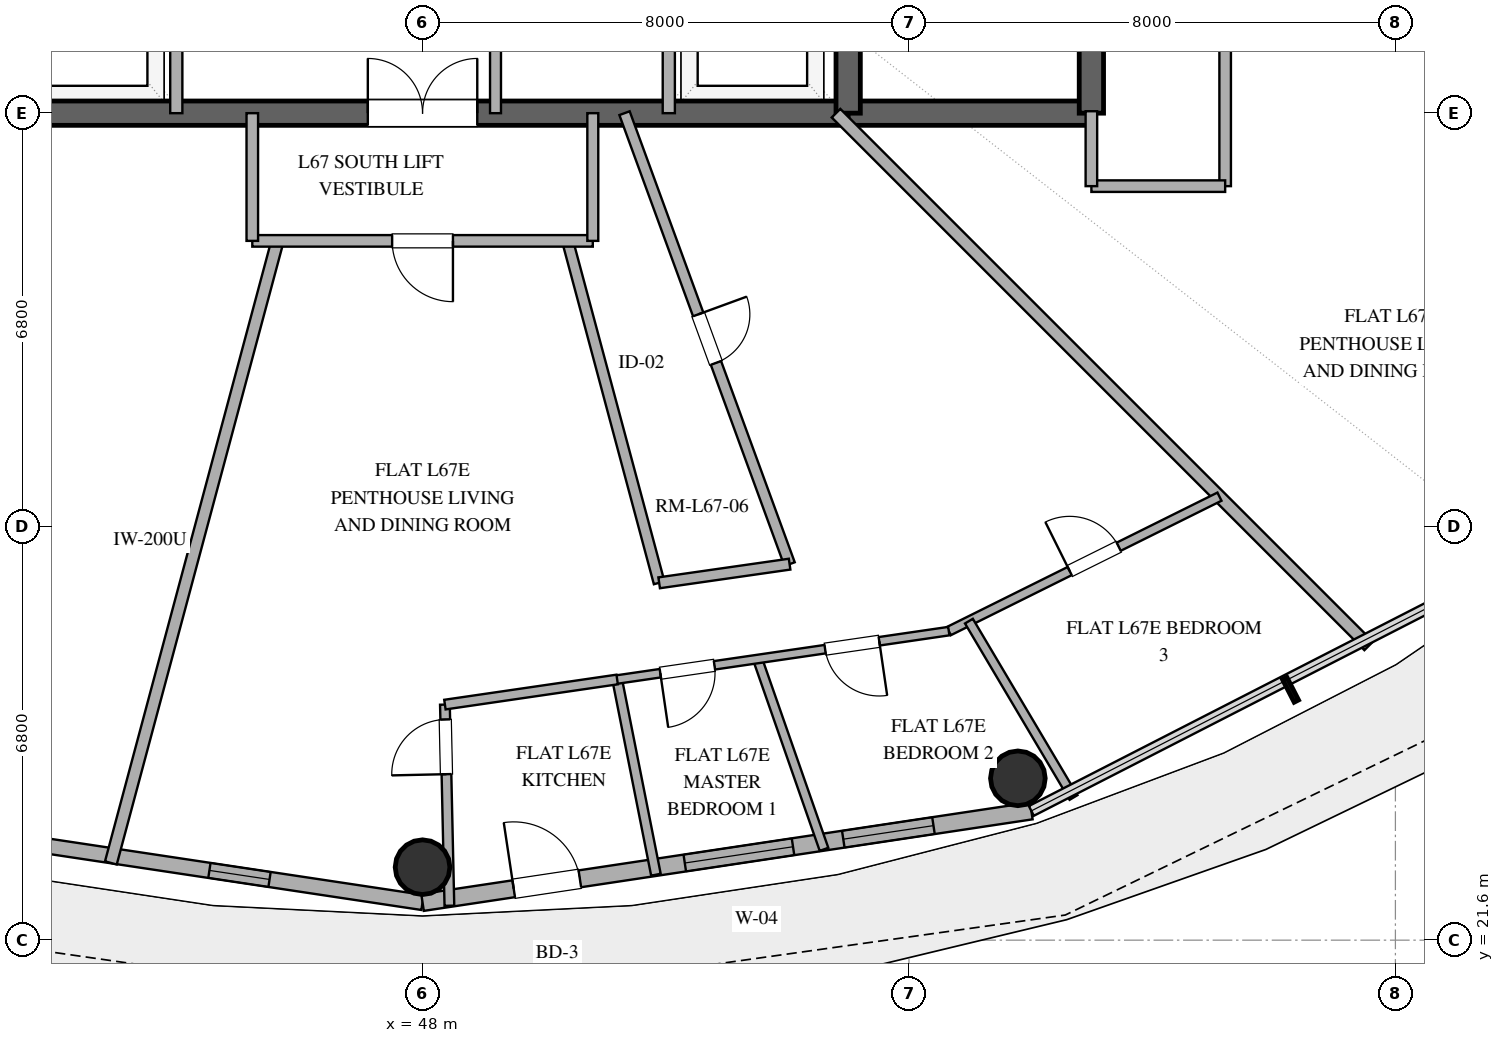
"""IFC4 building model, lengths in metres.
Left out: names, types, materials, properties, quantities, classifications, styles, units other than length and angle.
Written with IfcOpenShell. Run it as: python <this file> out.ifc"""

import sys

from ifc_helpers import new_model, si_unit, direction, frame, frame_2d, origin, origin_2d, place, context, subcontext, project, spatial, rectangle, hollow_circle, extrude, element, fill, save


model = new_model("IFC4")
c1 = context("Model", 3, precision=1e-05, world=origin(), true_north=direction((0.0, 1.0)))
c2 = subcontext(c1, "Body", "Model", "MODEL_VIEW")
j1 = project(units=[si_unit("LENGTHUNIT", "METRE"), si_unit("PLANEANGLEUNIT", "RADIAN")], contexts=[c1])
p1 = place(None, origin())
s1 = spatial("IfcSite", under=j1, at=p1, CompositionType="ELEMENT")
p2 = place(p1, origin())
s2 = spatial("IfcBuilding", under=s1, at=p2, CompositionType="ELEMENT")
p3 = place(p2, frame((0.0, 0.0, 262.2)))
s3 = spatial("IfcBuildingStorey", under=s2, at=p3, CompositionType="ELEMENT", Elevation=262.2)
p4 = place(p3, frame((41.0, 35.2, 0.0), z_axis=(0.0, 0.0, 1.0), x_axis=(1.0, 0.0, 0.0)))
e1 = element("IfcWall", 1, at=p4, inside=s3, PredefinedType="SHEAR", context=c2, shape_type="SweptSolid", body=[
    extrude(rectangle(XDim=14.0, YDim=0.4, at=frame_2d((7.0, 0.0))), origin(), (0.0, 0.0, 1.0), 3.37),
])
p5 = place(p4, frame((6.1, 0.0, 0.0)))
e2 = element("IfcOpeningElement", 2, at=p5, cuts=e1, PredefinedType="OPENING", context=c2, shape_type="SweptSolid", body=[
    extrude(rectangle(XDim=1.8, YDim=2.25, at=frame_2d((0.9, 1.125))), frame((0.0, 0.21, 0.0), z_axis=(0.0, -1.0, 0.0), x_axis=(1.0, 0.0, 0.0)), (0.0, 0.0, 1.0), 0.42),
])
p6 = place(p3, frame((55.0, 35.2, 0.0), z_axis=(0.0, 0.0, 1.0), x_axis=(1.0, 0.0, 0.0)))
e3 = element("IfcWall", 3, at=p6, inside=s3, PredefinedType="SHEAR", context=c2, shape_type="SweptSolid", body=[
    extrude(rectangle(XDim=4.0, YDim=0.4, at=frame_2d((2.0, 0.0))), origin(), (0.0, 0.0, 1.0), 3.37),
])
p7 = place(p3, frame((59.0, 35.2, 0.0), z_axis=(0.0, 0.0, 1.0), x_axis=(0.0, 1.0, 0.0)))
e4 = element("IfcWall", 4, at=p7, inside=s3, PredefinedType="SHEAR", context=c2, shape_type="SweptSolid", body=[
    extrude(rectangle(XDim=13.6, YDim=0.4, at=frame_2d((6.8, 0.0))), origin(), (0.0, 0.0, 1.0), 3.37),
])
p8 = place(p7, frame((1.5, 0.0, 0.0)))
e5 = element("IfcOpeningElement", 5, at=p8, cuts=e4, PredefinedType="OPENING", context=c2, shape_type="SweptSolid", body=[
    extrude(rectangle(XDim=1.2, YDim=2.15, at=frame_2d((0.6, 1.075))), frame((0.0, 0.21, 0.0), z_axis=(0.0, -1.0, 0.0), x_axis=(1.0, 0.0, 0.0)), (0.0, 0.0, 1.0), 0.42),
])
p9 = place(p3, frame((55.0, 35.2, 0.0), z_axis=(0.0, 0.0, 1.0), x_axis=(0.0, 1.0, 0.0)))
e6 = element("IfcWall", 6, at=p9, inside=s3, PredefinedType="SHEAR", context=c2, shape_type="SweptSolid", body=[
    extrude(rectangle(XDim=13.6, YDim=0.4, at=frame_2d((6.8, 0.0))), origin(), (0.0, 0.0, 1.0), 3.37),
])
p10 = place(p9, frame((1.15, 0.0, 0.0)))
e7 = element("IfcOpeningElement", 7, at=p10, cuts=e6, PredefinedType="OPENING", context=c2, shape_type="SweptSolid", body=[
    extrude(rectangle(XDim=1.1, YDim=2.2, at=frame_2d((0.55, 1.1))), frame((0.0, 0.21, 0.0), z_axis=(0.0, -1.0, 0.0), x_axis=(1.0, 0.0, 0.0)), (0.0, 0.0, 1.0), 0.42),
])
for number, where, z_axis, x_axis in (
    (8, (48.0, 22.8, 0.0), (0.0, 0.0, 1.0), (1.0, 0.0, 0.0)),
    (9, (57.791, 24.261, 0.0), (0.0, 0.0, 1.0), (1.0, 0.0, 0.0)),
):
    element("IfcColumn", number, at=place(p3, frame(where, z_axis=z_axis, x_axis=x_axis)), inside=s3, PredefinedType="COLUMN", context=c2, shape_type="SweptSolid", body=[
        extrude(hollow_circle(Radius=0.45, WallThickness=0.025, at=origin_2d()), origin(), (0.0, 0.0, 1.0), 3.37),
    ])
p11 = place(p3, frame((37.987, 23.726, 0.0), z_axis=(0.0, 0.0, 1.0), x_axis=(0.988882522213, -0.148698881169, 0.0)))
e10 = element("IfcWall", 10, at=p11, inside=s3, PredefinedType="SOLIDWALL", context=c2, shape_type="SweptSolid", body=[
    extrude(rectangle(XDim=10.125, YDim=0.25, at=frame_2d((5.062, 0.0))), origin(), (0.0, 0.0, 1.0), 3.37),
])
p12 = place(p11, frame((6.581, 0.0, 1.42)))
e11 = element("IfcOpeningElement", 11, at=p12, cuts=e10, PredefinedType="OPENING", context=c2, shape_type="SweptSolid", body=[
    extrude(rectangle(XDim=1.0, YDim=1.05, at=frame_2d((0.5, 0.525))), frame((0.0, 0.135, 0.0), z_axis=(0.0, -1.0, 0.0), x_axis=(1.0, 0.0, 0.0)), (0.0, 0.0, 1.0), 0.27),
])
p13 = place(p3, frame((48.0, 22.22, 0.0), z_axis=(0.0, 0.0, 1.0), x_axis=(0.988882522213, 0.148698881169, 0.0)))
e12 = element("IfcWall", 12, at=p13, inside=s3, PredefinedType="SOLIDWALL", context=c2, shape_type="SweptSolid", body=[
    extrude(rectangle(XDim=10.125, YDim=0.28, at=frame_2d((5.062, 0.0))), origin(), (0.0, 0.0, 1.0), 3.37),
])
p14 = place(p13, frame((1.516, 0.0, 0.0)))
e13 = element("IfcOpeningElement", 13, at=p14, cuts=e12, PredefinedType="OPENING", context=c2, shape_type="SweptSolid", body=[
    extrude(rectangle(XDim=1.1, YDim=2.25, at=frame_2d((0.55, 1.125))), frame((0.0, 0.15, 0.0), z_axis=(0.0, -1.0, 0.0), x_axis=(1.0, 0.0, 0.0)), (0.0, 0.0, 1.0), 0.3),
])
p15 = place(p13, frame((4.361, 0.0, 0.85)))
e14 = element("IfcOpeningElement", 14, at=p15, cuts=e12, PredefinedType="OPENING", context=c2, shape_type="SweptSolid", body=[
    extrude(rectangle(XDim=1.8, YDim=2.2, at=frame_2d((0.9, 1.1))), frame((0.0, 0.15, 0.0), z_axis=(0.0, -1.0, 0.0), x_axis=(1.0, 0.0, 0.0)), (0.0, 0.0, 1.0), 0.3),
])
p16 = place(p13, frame((6.997, 0.0, 0.85)))
e15 = element("IfcOpeningElement", 15, at=p16, cuts=e12, PredefinedType="OPENING", context=c2, shape_type="SweptSolid", body=[
    extrude(rectangle(XDim=1.5, YDim=2.0, at=frame_2d((0.75, 1.0))), frame((0.0, 0.15, 0.0), z_axis=(0.0, -1.0, 0.0), x_axis=(1.0, 0.0, 0.0)), (0.0, 0.0, 1.0), 0.3),
])
for number, where, z_axis, x_axis in (
    (16, (43.95, 35.2, 0.0), (0.0, 0.0, 1.0), (0.0, 1.0, 0.0)),
    (17, (52.05, 35.2, 0.0), (0.0, 0.0, 1.0), (0.0, 1.0, 0.0)),
):
    element("IfcWall", number, at=place(p3, frame(where, z_axis=z_axis, x_axis=x_axis)), inside=s3, PredefinedType="SOLIDWALL", context=c2, shape_type="SweptSolid", body=[
        extrude(rectangle(XDim=3.2, YDim=0.2, at=frame_2d((1.6, 0.0))), origin(), (0.0, 0.0, 1.0), 2.73),
    ])
p17 = place(p3, frame((49.2, 35.2, 0.0), z_axis=(0.0, 0.0, 1.0), x_axis=(0.0, 1.0, 0.0)))
e18 = element("IfcWall", 18, at=p17, inside=s3, PredefinedType="PLUMBINGWALL", context=c2, shape_type="SweptSolid", body=[
    extrude(rectangle(XDim=3.2, YDim=0.18, at=frame_2d((1.6, 0.0))), origin(), (0.0, 0.0, 1.0), 2.73),
])
p18 = place(p17, frame((1.15, 0.0, 0.0)))
e19 = element("IfcOpeningElement", 19, at=p18, cuts=e18, PredefinedType="OPENING", context=c2, shape_type="SweptSolid", body=[
    extrude(rectangle(XDim=0.9, YDim=2.1, at=frame_2d((0.45, 1.05))), frame((0.0, 0.1, 0.0), z_axis=(0.0, -1.0, 0.0), x_axis=(1.0, 0.0, 0.0)), (0.0, 0.0, 1.0), 0.2),
])
p19 = place(p3, frame((42.874, 22.87, 0.0), z_axis=(0.0, 0.0, 1.0), x_axis=(0.258827496332, 0.965923561749, 0.0)))
e20 = element("IfcWall", 20, at=p19, inside=s3, PredefinedType="PARTITIONING", context=c2, shape_type="SweptSolid", body=[
    extrude(rectangle(XDim=10.591, YDim=0.2, at=frame_2d((5.295, 0.0))), origin(), (0.0, 0.0, 1.0), 2.73),
])
p20 = place(p3, frame((63.561, 26.439, 0.0), z_axis=(0.0, 0.0, 1.0), x_axis=(-0.707106781187, 0.707106781187, 0.0)))
e21 = element("IfcWall", 21, at=p20, inside=s3, PredefinedType="PARTITIONING", context=c2, shape_type="SweptSolid", body=[
    extrude(rectangle(XDim=12.389, YDim=0.2, at=frame_2d((6.195, 0.0))), origin(), (0.0, 0.0, 1.0), 2.73),
])
p21 = place(p3, frame((51.322, 35.2, 0.0), z_axis=(0.0, 0.0, 1.0), x_axis=(0.343730484072, -0.939068343796, 0.0)))
e22 = element("IfcWall", 22, at=p21, inside=s3, PredefinedType="PLUMBINGWALL", context=c2, shape_type="SweptSolid", body=[
    extrude(rectangle(XDim=7.897, YDim=0.18, at=frame_2d((3.949, 0.0))), origin(), (0.0, 0.0, 1.0), 2.73),
])
p22 = place(p21, frame((3.524, 0.0, 0.0)))
e23 = element("IfcOpeningElement", 23, at=p22, cuts=e22, PredefinedType="OPENING", context=c2, shape_type="SweptSolid", body=[
    extrude(rectangle(XDim=0.85, YDim=2.1, at=frame_2d((0.425, 1.05))), frame((0.0, 0.1, 0.0), z_axis=(0.0, -1.0, 0.0), x_axis=(1.0, 0.0, 0.0)), (0.0, 0.0, 1.0), 0.2),
])
p23 = place(p3, frame((51.892, 27.477, 0.0), z_axis=(0.0, 0.0, 1.0), x_axis=(-0.258831810373, 0.965922405755, 0.0)))
e24 = element("IfcWall", 24, at=p23, inside=s3, PredefinedType="PLUMBINGWALL", context=c2, shape_type="SweptSolid", body=[
    extrude(rectangle(XDim=5.822, YDim=0.18, at=frame_2d((2.911, 0.0))), origin(), (0.0, 0.0, 1.0), 2.73),
])
p24 = place(p3, frame((50.8, 33.1, 0.0), z_axis=(0.0, 0.0, 1.0), x_axis=(-1.0, 0.0, 0.0)))
e25 = element("IfcWall", 25, at=p24, inside=s3, PredefinedType="PARTITIONING", context=c2, shape_type="SweptSolid", body=[
    extrude(rectangle(XDim=5.6, YDim=0.19, at=frame_2d((2.8, 0.0))), origin(), (0.0, 0.0, 1.0), 2.73),
])
p25 = place(p24, frame((2.3, 0.0, 0.0)))
e26 = element("IfcOpeningElement", 26, at=p25, cuts=e25, PredefinedType="OPENING", context=c2, shape_type="SweptSolid", body=[
    extrude(rectangle(XDim=1.0, YDim=2.2, at=frame_2d((0.5, 1.1))), frame((0.0, 0.105, 0.0), z_axis=(0.0, -1.0, 0.0), x_axis=(1.0, 0.0, 0.0)), (0.0, 0.0, 1.0), 0.21),
])
p26 = place(p3, frame((56.655, 26.682, 0.0), z_axis=(0.0, 0.0, 1.0), x_axis=(0.895583327025, 0.444893812449, 0.0)))
e27 = element("IfcWall", 27, at=p26, inside=s3, PredefinedType="PARTITIONING", context=c2, shape_type="SweptSolid", body=[
    extrude(rectangle(XDim=4.971, YDim=0.15, at=frame_2d((2.485, 0.0))), origin(), (0.0, 0.0, 1.0), 2.73),
])
p27 = place(p26, frame((2.22, 0.0, 0.0)))
e28 = element("IfcOpeningElement", 28, at=p27, cuts=e27, PredefinedType="OPENING", context=c2, shape_type="SweptSolid", body=[
    extrude(rectangle(XDim=0.9, YDim=2.1, at=frame_2d((0.45, 1.05))), frame((0.0, 0.085, 0.0), z_axis=(0.0, -1.0, 0.0), x_axis=(1.0, 0.0, 0.0)), (0.0, 0.0, 1.0), 0.17),
])
p28 = place(p3, frame((61.2, 38.496, 0.0), z_axis=(0.0, 0.0, 1.0), x_axis=(0.0, -1.0, 0.0)))
e29 = element("IfcWall", 29, at=p28, inside=s3, PredefinedType="PARTITIONING", context=c2, shape_type="SweptSolid", body=[
    extrude(rectangle(XDim=4.496, YDim=0.19, at=frame_2d((2.248, 0.0))), origin(), (0.0, 0.0, 1.0), 2.73),
])
p29 = place(p3, frame((58.706, 23.946, 0.0), z_axis=(0.0, 0.0, 1.0), x_axis=(-0.510016720958, 0.860164486795, 0.0)))
e30 = element("IfcWall", 30, at=p29, inside=s3, PredefinedType="PARTITIONING", context=c2, shape_type="SweptSolid", body=[
    extrude(rectangle(XDim=3.372, YDim=0.15, at=frame_2d((1.686, 0.0))), origin(), (0.0, 0.0, 1.0), 2.73),
])
p30 = place(p3, frame((53.51, 26.223, 0.0), z_axis=(0.0, 0.0, 1.0), x_axis=(0.329694293347, -0.944087746417, 0.0)))
e31 = element("IfcWall", 31, at=p30, inside=s3, PredefinedType="PARTITIONING", context=c2, shape_type="SweptSolid", body=[
    extrude(rectangle(XDim=3.315, YDim=0.15, at=frame_2d((1.658, 0.0))), origin(), (0.0, 0.0, 1.0), 2.73),
])
p31 = place(p3, frame((48.442, 22.166, 0.0), z_axis=(0.0, 0.0, 1.0), x_axis=(-0.022285576985, 0.999751645689, 0.0)))
e32 = element("IfcWall", 32, at=p31, inside=s3, PredefinedType="PLUMBINGWALL", context=c2, shape_type="SweptSolid", body=[
    extrude(rectangle(XDim=3.308, YDim=0.16, at=frame_2d((1.654, 0.0))), origin(), (0.0, 0.0, 1.0), 2.73),
])
p32 = place(p31, frame((2.164, 0.0, 0.0)))
e33 = element("IfcOpeningElement", 33, at=p32, cuts=e32, PredefinedType="OPENING", context=c2, shape_type="SweptSolid", body=[
    extrude(rectangle(XDim=0.9, YDim=2.1, at=frame_2d((0.45, 1.05))), frame((0.0, 0.09, 0.0), z_axis=(0.0, -1.0, 0.0), x_axis=(1.0, 0.0, 0.0)), (0.0, 0.0, 1.0), 0.18),
])
p33 = place(p3, frame((51.201, 25.887, 0.0), z_axis=(0.0, 0.0, 1.0), x_axis=(0.194810759156, -0.980840847496, 0.0)))
e34 = element("IfcWall", 34, at=p33, inside=s3, PredefinedType="PLUMBINGWALL", context=c2, shape_type="SweptSolid", body=[
    extrude(rectangle(XDim=3.273, YDim=0.16, at=frame_2d((1.637, 0.0))), origin(), (0.0, 0.0, 1.0), 2.73),
])
p34 = place(p3, frame((56.655, 26.682, 0.0), z_axis=(0.0, 0.0, 1.0), x_axis=(-0.989532194991, -0.144312283177, 0.0)))
e35 = element("IfcWall", 35, at=p34, inside=s3, PredefinedType="PARTITIONING", context=c2, shape_type="SweptSolid", body=[
    extrude(rectangle(XDim=5.544, YDim=0.14, at=frame_2d((2.772, 0.0))), origin(), (0.0, 0.0, 1.0), 2.73),
])
p35 = place(p34, frame((1.156, 0.0, 0.0)))
e36 = element("IfcOpeningElement", 36, at=p35, cuts=e35, PredefinedType="OPENING", context=c2, shape_type="SweptSolid", body=[
    extrude(rectangle(XDim=0.9, YDim=2.1, at=frame_2d((0.45, 1.05))), frame((0.0, 0.08, 0.0), z_axis=(0.0, -1.0, 0.0), x_axis=(1.0, 0.0, 0.0)), (0.0, 0.0, 1.0), 0.16),
])
p36 = place(p34, frame((3.895, 0.0, 0.0)))
e37 = element("IfcOpeningElement", 37, at=p36, cuts=e35, PredefinedType="OPENING", context=c2, shape_type="SweptSolid", body=[
    extrude(rectangle(XDim=0.9, YDim=2.1, at=frame_2d((0.45, 1.05))), frame((0.0, 0.08, 0.0), z_axis=(0.0, -1.0, 0.0), x_axis=(1.0, 0.0, 0.0)), (0.0, 0.0, 1.0), 0.16),
])
p37 = place(p3, frame((48.368, 25.474, 0.0), z_axis=(0.0, 0.0, 1.0), x_axis=(0.989534249572, 0.144298194456, 0.0)))
e38 = element("IfcWall", 38, at=p37, inside=s3, PredefinedType="PLUMBINGWALL", context=c2, shape_type="SweptSolid", body=[
    extrude(rectangle(XDim=2.863, YDim=0.16, at=frame_2d((1.431, 0.0))), origin(), (0.0, 0.0, 1.0), 2.73),
])
p38 = place(p3, frame((61.2, 34.0, 0.0), z_axis=(0.0, 0.0, 1.0), x_axis=(-1.0, 0.0, 0.0)))
e39 = element("IfcWall", 39, at=p38, inside=s3, PredefinedType="PARTITIONING", context=c2, shape_type="SweptSolid", body=[
    extrude(rectangle(XDim=2.2, YDim=0.19, at=frame_2d((1.1, 0.0))), origin(), (0.0, 0.0, 1.0), 2.73),
])
p39 = place(p3, frame((54.037, 27.784, 0.0), z_axis=(0.0, 0.0, 1.0), x_axis=(-0.989920178177, -0.141626412926, 0.0)))
e40 = element("IfcWall", 40, at=p39, inside=s3, PredefinedType="PLUMBINGWALL", context=c2, shape_type="SweptSolid", body=[
    extrude(rectangle(XDim=2.167, YDim=0.18, at=frame_2d((1.083, 0.0))), origin(), (0.0, 0.0, 1.0), 2.73),
])
p40 = place(p3, frame((45.2, 35.2, 0.0), z_axis=(0.0, 0.0, 1.0), x_axis=(0.0, -1.0, 0.0)))
e41 = element("IfcWall", 41, at=p40, inside=s3, PredefinedType="PARTITIONING", context=c2, shape_type="SweptSolid", body=[
    extrude(rectangle(XDim=2.1, YDim=0.19, at=frame_2d((1.05, 0.0))), origin(), (0.0, 0.0, 1.0), 2.73),
])
p41 = place(p3, frame((50.8, 35.2, 0.0), z_axis=(0.0, 0.0, 1.0), x_axis=(0.0, -1.0, 0.0)))
e42 = element("IfcWall", 42, at=p41, inside=s3, PredefinedType="PLUMBINGWALL", context=c2, shape_type="SweptSolid", body=[
    extrude(rectangle(XDim=2.1, YDim=0.18, at=frame_2d((1.05, 0.0))), origin(), (0.0, 0.0, 1.0), 2.73),
])
p42 = place(p3, frame((59.0, 34.0, 0.0), z_axis=(0.0, 0.0, 1.0), x_axis=(0.0, 1.0, 0.0)))
e43 = element("IfcWall", 43, at=p42, inside=s3, PredefinedType="PARTITIONING", context=c2, shape_type="SweptSolid", body=[
    extrude(rectangle(XDim=1.232, YDim=0.19, at=frame_2d((0.616, 0.0))), origin(), (0.0, 0.0, 1.0), 2.73),
])
p43 = place(p14, origin())
e44 = element("IfcDoor", 44, at=p43, inside=s3, OperationType="SINGLE_SWING_LEFT", PredefinedType="DOOR", context=c2, shape_type="SweptSolid", body=[
    extrude(rectangle(XDim=1.1, YDim=2.25, at=frame_2d((0.55, 1.125))), frame((0.0, 0.025, 0.0), z_axis=(0.0, -1.0, 0.0), x_axis=(1.0, 0.0, 0.0)), (0.0, 0.0, 1.0), 0.05),
])
fill(e13, e44)
p44 = place(p15, origin())
e45 = element("IfcWindow", 45, at=p44, inside=s3, PartitioningType="SINGLE_PANEL", PredefinedType="WINDOW", context=c2, shape_type="SweptSolid", body=[
    extrude(rectangle(XDim=1.8, YDim=2.2, at=frame_2d((0.9, 1.1))), frame((0.0, 0.03, 0.0), z_axis=(0.0, -1.0, 0.0), x_axis=(1.0, 0.0, 0.0)), (0.0, 0.0, 1.0), 0.06),
])
fill(e14, e45)
p45 = place(p16, origin())
e46 = element("IfcWindow", 46, at=p45, inside=s3, PartitioningType="SINGLE_PANEL", PredefinedType="WINDOW", context=c2, shape_type="SweptSolid", body=[
    extrude(rectangle(XDim=1.5, YDim=2.0, at=frame_2d((0.75, 1.0))), frame((0.0, 0.03, 0.0), z_axis=(0.0, -1.0, 0.0), x_axis=(1.0, 0.0, 0.0)), (0.0, 0.0, 1.0), 0.06),
])
fill(e15, e46)
p46 = place(p12, origin())
e47 = element("IfcWindow", 47, at=p46, inside=s3, PartitioningType="SINGLE_PANEL", PredefinedType="WINDOW", context=c2, shape_type="SweptSolid", body=[
    extrude(rectangle(XDim=1.0, YDim=1.05, at=frame_2d((0.5, 0.525))), frame((0.0, 0.03, 0.0), z_axis=(0.0, -1.0, 0.0), x_axis=(1.0, 0.0, 0.0)), (0.0, 0.0, 1.0), 0.06),
])
fill(e11, e47)
p47 = place(p5, origin())
e48 = element("IfcDoor", 48, at=p47, inside=s3, OperationType="DOUBLE_DOOR_SINGLE_SWING", PredefinedType="DOOR", context=c2, shape_type="SweptSolid", body=[
    extrude(rectangle(XDim=1.8, YDim=2.25, at=frame_2d((0.9, 1.125))), frame((0.0, 0.025, 0.0), z_axis=(0.0, -1.0, 0.0), x_axis=(1.0, 0.0, 0.0)), (0.0, 0.0, 1.0), 0.05),
])
fill(e2, e48)
p48 = place(p22, origin())
e49 = element("IfcDoor", 49, at=p48, inside=s3, OperationType="SINGLE_SWING_LEFT", PredefinedType="DOOR", context=c2, shape_type="SweptSolid", body=[
    extrude(rectangle(XDim=0.85, YDim=2.1, at=frame_2d((0.425, 1.05))), frame((0.0, 0.025, 0.0), z_axis=(0.0, -1.0, 0.0), x_axis=(1.0, 0.0, 0.0)), (0.0, 0.0, 1.0), 0.05),
])
fill(e23, e49)
p49 = place(p25, origin())
e50 = element("IfcDoor", 50, at=p49, inside=s3, OperationType="SINGLE_SWING_LEFT", PredefinedType="DOOR", context=c2, shape_type="SweptSolid", body=[
    extrude(rectangle(XDim=1.0, YDim=2.2, at=frame_2d((0.5, 1.1))), frame((0.0, 0.025, 0.0), z_axis=(0.0, -1.0, 0.0), x_axis=(1.0, 0.0, 0.0)), (0.0, 0.0, 1.0), 0.05),
])
fill(e26, e50)
p50 = place(p27, origin())
e51 = element("IfcDoor", 51, at=p50, inside=s3, OperationType="SINGLE_SWING_LEFT", PredefinedType="DOOR", context=c2, shape_type="SweptSolid", body=[
    extrude(rectangle(XDim=0.9, YDim=2.1, at=frame_2d((0.45, 1.05))), frame((0.0, 0.025, 0.0), z_axis=(0.0, -1.0, 0.0), x_axis=(1.0, 0.0, 0.0)), (0.0, 0.0, 1.0), 0.05),
])
fill(e28, e51)
p51 = place(p32, origin())
e52 = element("IfcDoor", 52, at=p51, inside=s3, OperationType="SINGLE_SWING_LEFT", PredefinedType="DOOR", context=c2, shape_type="SweptSolid", body=[
    extrude(rectangle(XDim=0.9, YDim=2.1, at=frame_2d((0.45, 1.05))), frame((0.0, 0.025, 0.0), z_axis=(0.0, -1.0, 0.0), x_axis=(1.0, 0.0, 0.0)), (0.0, 0.0, 1.0), 0.05),
])
fill(e33, e52)
p52 = place(p35, origin())
e53 = element("IfcDoor", 53, at=p52, inside=s3, OperationType="SINGLE_SWING_LEFT", PredefinedType="DOOR", context=c2, shape_type="SweptSolid", body=[
    extrude(rectangle(XDim=0.9, YDim=2.1, at=frame_2d((0.45, 1.05))), frame((0.0, 0.025, 0.0), z_axis=(0.0, -1.0, 0.0), x_axis=(1.0, 0.0, 0.0)), (0.0, 0.0, 1.0), 0.05),
])
fill(e36, e53)
p53 = place(p36, origin())
e54 = element("IfcDoor", 54, at=p53, inside=s3, OperationType="SINGLE_SWING_RIGHT", PredefinedType="DOOR", context=c2, shape_type="SweptSolid", body=[
    extrude(rectangle(XDim=0.9, YDim=2.1, at=frame_2d((0.45, 1.05))), frame((0.0, 0.025, 0.0), z_axis=(0.0, -1.0, 0.0), x_axis=(1.0, 0.0, 0.0)), (0.0, 0.0, 1.0), 0.05),
])
fill(e37, e54)
save(model, sys.argv[1])
